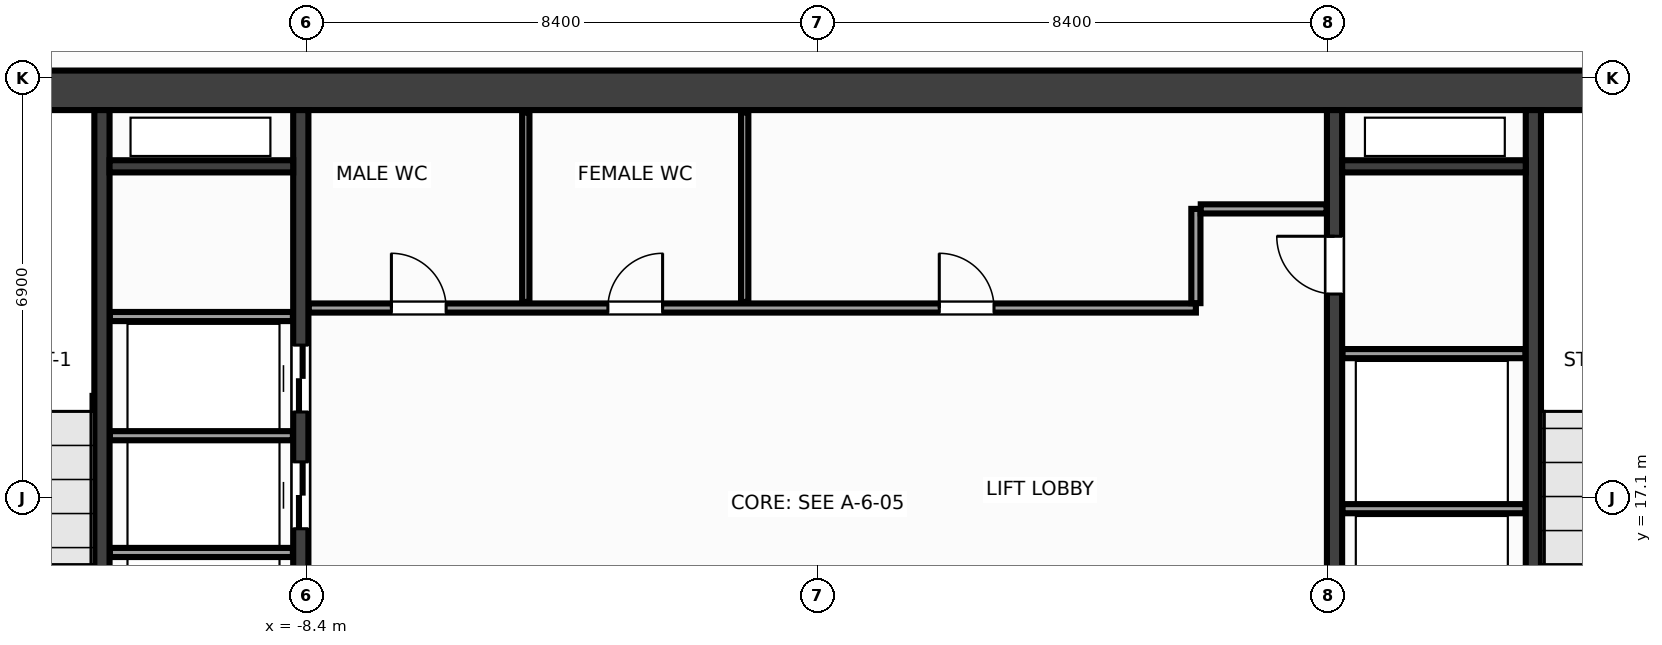
"""IFC4 building model, lengths in metres.
Left out: names, types, materials, properties, quantities, classifications, styles, units other than length and angle.
Written with IfcOpenShell. Run it as: python <this file> out.ifc"""

import sys

from ifc_helpers import new_model, si_unit, direction, frame, frame_2d, origin, place, context, subcontext, project, spatial, rectangle, extrude, source, transform, mapped, element, fill, save


model = new_model("IFC4")
c1 = context("Model", 3, precision=1e-05, world=origin(), true_north=direction((0.0, 1.0)))
c2 = subcontext(c1, "Body", "Model", "MODEL_VIEW")
j1 = project(units=[si_unit("LENGTHUNIT", "METRE"), si_unit("PLANEANGLEUNIT", "RADIAN")], contexts=[c1])
p1 = place(None, origin())
s1 = spatial("IfcSite", under=j1, at=p1, CompositionType="ELEMENT")
p2 = place(p1, origin())
s2 = spatial("IfcBuilding", under=s1, at=p2, CompositionType="ELEMENT")
p3 = place(p2, frame((0.0, 0.0, 153.2)))
s3 = spatial("IfcBuildingStorey", under=s2, at=p3, CompositionType="ELEMENT", Elevation=153.2)
m1 = source(origin(), c2, "Body", "SweptSolid", [
    extrude(rectangle(XDim=31.85, YDim=0.65, at=frame_2d((15.925, 0.0))), origin(), (0.0, 0.0, 1.0), 3.6),
])
p4 = place(p3, frame((-15.925, 23.8, 0.0), z_axis=(0.0, 0.0, 1.0), x_axis=(1.0, 0.0, 0.0)))
e1 = element("IfcWall", 1, at=p4, inside=s3, PredefinedType="SHEAR", context=c2, shape_type="MappedRepresentation", body=[
    mapped(m1, transform((0.0, 0.0, 0.0), x_axis=(1.0, 0.0, 0.0), y_axis=(0.0, 1.0, 0.0), z_axis=(0.0, 0.0, 1.0), scale=1.0)),
])
m2 = source(origin(), c2, "Body", "SweptSolid", [
    extrude(rectangle(XDim=12.95, YDim=0.25, at=frame_2d((6.475, 0.0))), origin(), (0.0, 0.0, 1.0), 3.6),
])
p5 = place(p3, frame((-8.5, 10.525, 0.0), z_axis=(0.0, 0.0, 1.0), x_axis=(0.0, 1.0, 0.0)))
e2 = element("IfcWall", 2, at=p5, inside=s3, PredefinedType="SHEAR", context=c2, shape_type="MappedRepresentation", body=[
    mapped(m2, transform((0.0, 0.0, 0.0), x_axis=(1.0, 0.0, 0.0), y_axis=(0.0, 1.0, 0.0), z_axis=(0.0, 0.0, 1.0), scale=1.0)),
])
p6 = place(p5, frame((4.145, 0.0, 0.0)))
e3 = element("IfcOpeningElement", 3, at=p6, cuts=e2, PredefinedType="OPENING", context=c2, shape_type="SweptSolid", body=[
    extrude(rectangle(XDim=1.1, YDim=2.15, at=frame_2d((0.55, 1.075))), frame((0.0, 0.137, 0.0), z_axis=(0.0, -1.0, 0.0), x_axis=(1.0, 0.0, 0.0)), (0.0, 0.0, 1.0), 0.274),
])
p7 = place(p5, frame((6.065, 0.0, 0.0)))
e4 = element("IfcOpeningElement", 4, at=p7, cuts=e2, PredefinedType="OPENING", context=c2, shape_type="SweptSolid", body=[
    extrude(rectangle(XDim=1.1, YDim=2.15, at=frame_2d((0.55, 1.075))), frame((0.0, 0.137, 0.0), z_axis=(0.0, -1.0, 0.0), x_axis=(1.0, 0.0, 0.0)), (0.0, 0.0, 1.0), 0.274),
])
p8 = place(p5, frame((7.985, 0.0, 0.0)))
e5 = element("IfcOpeningElement", 5, at=p8, cuts=e2, PredefinedType="OPENING", context=c2, shape_type="SweptSolid", body=[
    extrude(rectangle(XDim=1.1, YDim=2.15, at=frame_2d((0.55, 1.075))), frame((0.0, 0.137, 0.0), z_axis=(0.0, -1.0, 0.0), x_axis=(1.0, 0.0, 0.0)), (0.0, 0.0, 1.0), 0.274),
])
p9 = place(p3, frame((8.5, 10.525, 0.0), z_axis=(0.0, 0.0, 1.0), x_axis=(0.0, 1.0, 0.0)))
e6 = element("IfcWall", 6, at=p9, inside=s3, PredefinedType="SHEAR", context=c2, shape_type="MappedRepresentation", body=[
    mapped(m2, transform((0.0, 0.0, 0.0), x_axis=(1.0, 0.0, 0.0), y_axis=(0.0, 1.0, 0.0), z_axis=(0.0, 0.0, 1.0), scale=1.0)),
])
p10 = place(p9, frame((9.925, 0.0, 0.0)))
e7 = element("IfcOpeningElement", 7, at=p10, cuts=e6, PredefinedType="OPENING", context=c2, shape_type="SweptSolid", body=[
    extrude(rectangle(XDim=0.95, YDim=2.15, at=frame_2d((0.475, 1.075))), frame((0.0, 0.137, 0.0), z_axis=(0.0, -1.0, 0.0), x_axis=(1.0, 0.0, 0.0)), (0.0, 0.0, 1.0), 0.274),
])
m3 = source(origin(), c2, "Body", "SweptSolid", [
    extrude(rectangle(XDim=9.1, YDim=0.25, at=frame_2d((4.55, 0.0))), origin(), (0.0, 0.0, 1.0), 3.6),
])
for number, where, z_axis, x_axis in (
    (8, (-11.77, 14.375, 0.0), (0.0, 0.0, 1.0), (0.0, 1.0, 0.0)),
    (9, (11.77, 14.375, 0.0), (0.0, 0.0, 1.0), (0.0, 1.0, 0.0)),
):
    element("IfcWall", number, at=place(p3, frame(where, z_axis=z_axis, x_axis=x_axis)), inside=s3, PredefinedType="SHEAR", context=c2, shape_type="MappedRepresentation", body=[
        mapped(m3, transform((0.0, 0.0, 0.0), x_axis=(1.0, 0.0, 0.0), y_axis=(0.0, 1.0, 0.0), z_axis=(0.0, 0.0, 1.0), scale=1.0)),
    ])
m4 = source(origin(), c2, "Body", "SweptSolid", [
    extrude(rectangle(XDim=3.02, YDim=0.2, at=frame_2d((1.51, 0.0))), origin(), (0.0, 0.0, 1.0), 3.6),
])
for number, where, z_axis, x_axis in (
    (10, (-11.645, 22.55, 0.0), (0.0, 0.0, 1.0), (1.0, 0.0, 0.0)),
    (11, (8.625, 22.55, 0.0), (0.0, 0.0, 1.0), (1.0, 0.0, 0.0)),
):
    element("IfcWall", number, at=place(p3, frame(where, z_axis=z_axis, x_axis=x_axis)), inside=s3, PredefinedType="SHEAR", context=c2, shape_type="MappedRepresentation", body=[
        mapped(m4, transform((0.0, 0.0, 0.0), x_axis=(1.0, 0.0, 0.0), y_axis=(0.0, 1.0, 0.0), z_axis=(0.0, 0.0, 1.0), scale=1.0)),
    ])
m5 = source(origin(), c2, "Body", "SweptSolid", [
    extrude(rectangle(XDim=3.01, YDim=0.15, at=frame_2d((1.505, 0.0))), origin(), (0.0, 0.0, 1.0), 3.38),
])
for number, where, z_axis, x_axis in (
    (12, (-11.64, 16.2, 0.0), (0.0, 0.0, 1.0), (1.0, 0.0, 0.0)),
    (13, (-11.64, 18.12, 0.0), (0.0, 0.0, 1.0), (1.0, 0.0, 0.0)),
    (14, (-11.64, 20.08, 0.0), (0.0, 0.0, 1.0), (1.0, 0.0, 0.0)),
    (15, (8.63, 16.92, 0.0), (0.0, 0.0, 1.0), (1.0, 0.0, 0.0)),
    (16, (8.63, 19.47, 0.0), (0.0, 0.0, 1.0), (1.0, 0.0, 0.0)),
):
    element("IfcWall", number, at=place(p3, frame(where, z_axis=z_axis, x_axis=x_axis)), inside=s3, PredefinedType="PARTITIONING", context=c2, shape_type="MappedRepresentation", body=[
        mapped(m5, transform((0.0, 0.0, 0.0), x_axis=(1.0, 0.0, 0.0), y_axis=(0.0, 1.0, 0.0), z_axis=(0.0, 0.0, 1.0), scale=1.0)),
    ])
m6 = source(origin(), c2, "Body", "SweptSolid", [
    extrude(rectangle(XDim=14.59, YDim=0.15, at=frame_2d((7.295, 0.0))), origin(), (0.0, 0.0, 1.0), 3.38),
])
p11 = place(p3, frame((-8.37, 20.22, 0.0), z_axis=(0.0, 0.0, 1.0), x_axis=(1.0, 0.0, 0.0)))
e17 = element("IfcWall", 17, at=p11, inside=s3, PredefinedType="PARTITIONING", context=c2, shape_type="MappedRepresentation", body=[
    mapped(m6, transform((0.0, 0.0, 0.0), x_axis=(1.0, 0.0, 0.0), y_axis=(0.0, 1.0, 0.0), z_axis=(0.0, 0.0, 1.0), scale=1.0)),
])
p12 = place(p11, frame((1.36, 0.0, 0.0)))
e18 = element("IfcOpeningElement", 18, at=p12, cuts=e17, PredefinedType="OPENING", context=c2, shape_type="SweptSolid", body=[
    extrude(rectangle(XDim=0.9, YDim=2.15, at=frame_2d((0.45, 1.075))), frame((0.0, 0.087, 0.0), z_axis=(0.0, -1.0, 0.0), x_axis=(1.0, 0.0, 0.0)), (0.0, 0.0, 1.0), 0.174),
])
p13 = place(p11, frame((4.92, 0.0, 0.0)))
e19 = element("IfcOpeningElement", 19, at=p13, cuts=e17, PredefinedType="OPENING", context=c2, shape_type="SweptSolid", body=[
    extrude(rectangle(XDim=0.9, YDim=2.15, at=frame_2d((0.45, 1.075))), frame((0.0, 0.087, 0.0), z_axis=(0.0, -1.0, 0.0), x_axis=(1.0, 0.0, 0.0)), (0.0, 0.0, 1.0), 0.174),
])
p14 = place(p11, frame((10.37, 0.0, 0.0)))
e20 = element("IfcOpeningElement", 20, at=p14, cuts=e17, PredefinedType="OPENING", context=c2, shape_type="SweptSolid", body=[
    extrude(rectangle(XDim=0.9, YDim=2.15, at=frame_2d((0.45, 1.075))), frame((0.0, 0.087, 0.0), z_axis=(0.0, -1.0, 0.0), x_axis=(1.0, 0.0, 0.0)), (0.0, 0.0, 1.0), 0.174),
])
m7 = source(origin(), c2, "Body", "SweptSolid", [
    extrude(rectangle(XDim=1.55, YDim=0.15, at=frame_2d((0.775, 0.0))), origin(), (0.0, 0.0, 1.0), 3.38),
])
p15 = place(p3, frame((6.22, 20.3, 0.0), z_axis=(0.0, 0.0, 1.0), x_axis=(0.0, 1.0, 0.0)))
e21 = element("IfcWall", 21, at=p15, inside=s3, PredefinedType="PARTITIONING", context=c2, shape_type="MappedRepresentation", body=[
    mapped(m7, transform((0.0, 0.0, 0.0), x_axis=(1.0, 0.0, 0.0), y_axis=(0.0, 1.0, 0.0), z_axis=(0.0, 0.0, 1.0), scale=1.0)),
])
m8 = source(origin(), c2, "Body", "SweptSolid", [
    extrude(rectangle(XDim=2.07, YDim=0.15, at=frame_2d((1.035, 0.0))), origin(), (0.0, 0.0, 1.0), 3.38),
])
p16 = place(p3, frame((6.3, 21.85, 0.0), z_axis=(0.0, 0.0, 1.0), x_axis=(1.0, 0.0, 0.0)))
e22 = element("IfcWall", 22, at=p16, inside=s3, PredefinedType="PARTITIONING", context=c2, shape_type="MappedRepresentation", body=[
    mapped(m8, transform((0.0, 0.0, 0.0), x_axis=(1.0, 0.0, 0.0), y_axis=(0.0, 1.0, 0.0), z_axis=(0.0, 0.0, 1.0), scale=1.0)),
])
m9 = source(origin(), c2, "Body", "SweptSolid", [
    extrude(rectangle(XDim=3.115, YDim=0.12, at=frame_2d((1.558, 0.0))), origin(), (0.0, 0.0, 1.0), 3.38),
])
for number, where, z_axis, x_axis in (
    (23, (-4.8, 20.32, 0.0), (0.0, 0.0, 1.0), (0.0, 1.0, 0.0)),
    (24, (-1.2, 20.32, 0.0), (0.0, 0.0, 1.0), (0.0, 1.0, 0.0)),
):
    element("IfcWall", number, at=place(p3, frame(where, z_axis=z_axis, x_axis=x_axis)), inside=s3, PredefinedType="PARTITIONING", context=c2, shape_type="MappedRepresentation", body=[
        mapped(m9, transform((0.0, 0.0, 0.0), x_axis=(1.0, 0.0, 0.0), y_axis=(0.0, 1.0, 0.0), z_axis=(0.0, 0.0, 1.0), scale=1.0)),
    ])
m10 = source(origin(), c2, "Body", "SweptSolid", [
    extrude(rectangle(XDim=1.1, YDim=2.15, at=frame_2d((0.55, 1.075))), frame((0.0, 0.025, 0.0), z_axis=(0.0, -1.0, 0.0), x_axis=(1.0, 0.0, 0.0)), (0.0, 0.0, 1.0), 0.05),
])
p17 = place(p7, origin())
e25 = element("IfcDoor", 25, at=p17, inside=s3, OperationType="DOUBLE_DOOR_SLIDING", PredefinedType="DOOR", context=c2, shape_type="MappedRepresentation", body=[
    mapped(m10, transform((0.0, 0.0, 0.0), x_axis=(1.0, 0.0, 0.0), y_axis=(0.0, 1.0, 0.0), z_axis=(0.0, 0.0, 1.0), scale=1.0)),
])
fill(e4, e25)
p18 = place(p8, origin())
e26 = element("IfcDoor", 26, at=p18, inside=s3, OperationType="DOUBLE_DOOR_SLIDING", PredefinedType="DOOR", context=c2, shape_type="MappedRepresentation", body=[
    mapped(m10, transform((0.0, 0.0, 0.0), x_axis=(1.0, 0.0, 0.0), y_axis=(0.0, 1.0, 0.0), z_axis=(0.0, 0.0, 1.0), scale=1.0)),
])
fill(e5, e26)
m11 = source(origin(), c2, "Body", "SweptSolid", [
    extrude(rectangle(XDim=0.95, YDim=2.15, at=frame_2d((0.475, 1.075))), frame((0.0, 0.025, 0.0), z_axis=(0.0, -1.0, 0.0), x_axis=(1.0, 0.0, 0.0)), (0.0, 0.0, 1.0), 0.05),
])
p19 = place(p10, origin())
e27 = element("IfcDoor", 27, at=p19, inside=s3, OperationType="SINGLE_SWING_RIGHT", PredefinedType="DOOR", context=c2, shape_type="MappedRepresentation", body=[
    mapped(m11, transform((0.0, 0.0, 0.0), x_axis=(1.0, 0.0, 0.0), y_axis=(0.0, 1.0, 0.0), z_axis=(0.0, 0.0, 1.0), scale=1.0)),
])
fill(e7, e27)
m12 = source(origin(), c2, "Body", "SweptSolid", [
    extrude(rectangle(XDim=0.9, YDim=2.15, at=frame_2d((0.45, 1.075))), frame((0.0, 0.025, 0.0), z_axis=(0.0, -1.0, 0.0), x_axis=(1.0, 0.0, 0.0)), (0.0, 0.0, 1.0), 0.05),
])
p20 = place(p12, origin())
e28 = element("IfcDoor", 28, at=p20, inside=s3, OperationType="SINGLE_SWING_LEFT", PredefinedType="DOOR", context=c2, shape_type="MappedRepresentation", body=[
    mapped(m12, transform((0.0, 0.0, 0.0), x_axis=(1.0, 0.0, 0.0), y_axis=(0.0, 1.0, 0.0), z_axis=(0.0, 0.0, 1.0), scale=1.0)),
])
fill(e18, e28)
p21 = place(p13, origin())
e29 = element("IfcDoor", 29, at=p21, inside=s3, OperationType="SINGLE_SWING_RIGHT", PredefinedType="DOOR", context=c2, shape_type="MappedRepresentation", body=[
    mapped(m12, transform((0.0, 0.0, 0.0), x_axis=(1.0, 0.0, 0.0), y_axis=(0.0, 1.0, 0.0), z_axis=(0.0, 0.0, 1.0), scale=1.0)),
])
fill(e19, e29)
p22 = place(p14, origin())
e30 = element("IfcDoor", 30, at=p22, inside=s3, OperationType="SINGLE_SWING_LEFT", PredefinedType="DOOR", context=c2, shape_type="MappedRepresentation", body=[
    mapped(m12, transform((0.0, 0.0, 0.0), x_axis=(1.0, 0.0, 0.0), y_axis=(0.0, 1.0, 0.0), z_axis=(0.0, 0.0, 1.0), scale=1.0)),
])
fill(e20, e30)
save(model, sys.argv[1])
